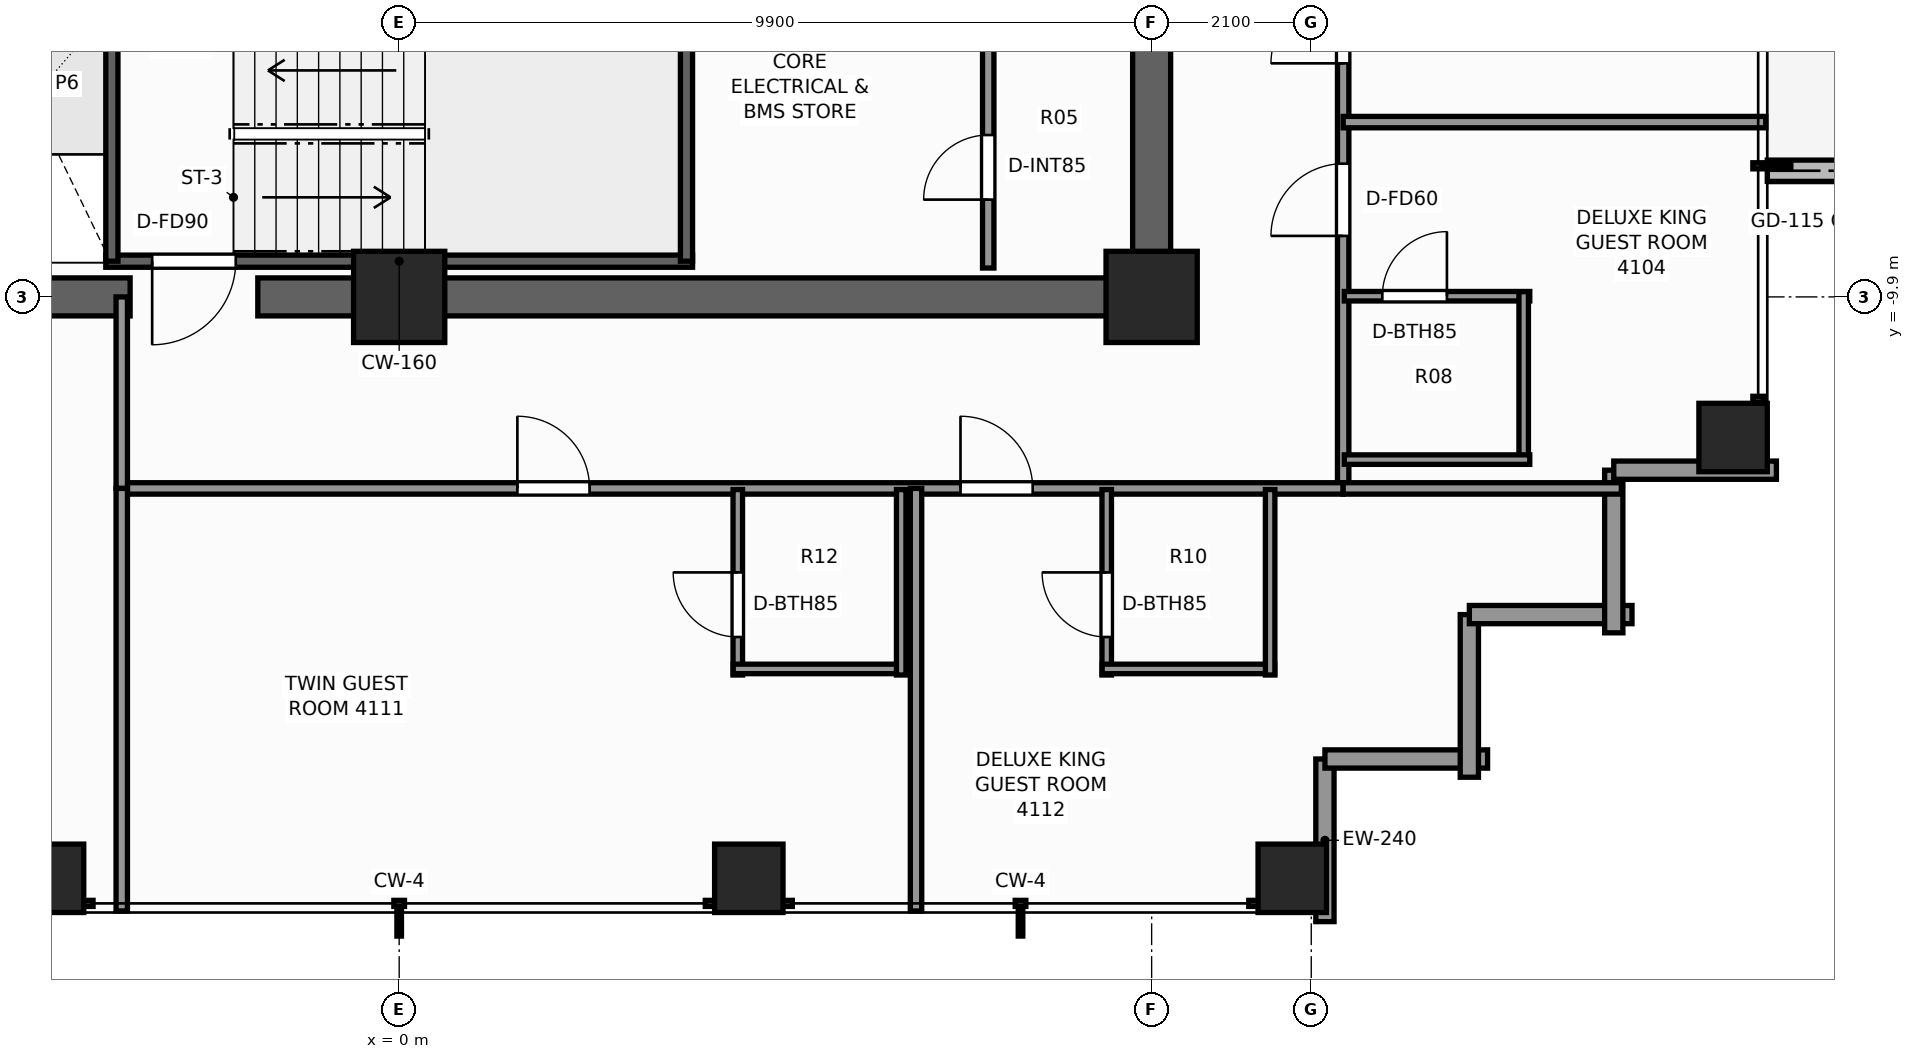
"""IFC4 building model, lengths in metres.
Left out: names, types, materials, properties, quantities, classifications, styles, units other than length and angle.
Written with IfcOpenShell. Run it as: python <this file> out.ifc"""

import sys

from ifc_helpers import new_model, si_unit, direction, frame, frame_2d, origin, origin_2d, place, context, subcontext, project, spatial, rectangle, extrude, element, fill, save


model = new_model("IFC4")
c1 = context("Model", 3, precision=1e-05, world=origin(), true_north=direction((0.0, 1.0)))
c2 = subcontext(c1, "Body", "Model", "MODEL_VIEW")
j1 = project(units=[si_unit("LENGTHUNIT", "METRE"), si_unit("PLANEANGLEUNIT", "RADIAN")], contexts=[c1])
p1 = place(None, origin())
s1 = spatial("IfcSite", under=j1, at=p1, CompositionType="ELEMENT")
p2 = place(p1, origin())
s2 = spatial("IfcBuilding", under=s1, at=p2, CompositionType="ELEMENT")
p3 = place(p2, frame((0.0, 0.0, 141.5)))
s3 = spatial("IfcBuildingStorey", under=s2, at=p3, CompositionType="ELEMENT", Elevation=141.5)
p4 = place(p3, frame((10.15, -9.9, 0.0), z_axis=(0.0, 0.0, 1.0), x_axis=(-1.0, 0.0, 0.0)))
e1 = element("IfcWall", 1, at=p4, inside=s3, PredefinedType="SHEAR", context=c2, shape_type="SweptSolid", body=[
    extrude(rectangle(XDim=12.01, YDim=0.5, at=frame_2d((6.005, 0.0))), origin(), (0.0, 0.0, 1.0), 3.3),
])
p5 = place(p3, frame((-3.54, -9.9, 0.0), z_axis=(0.0, 0.0, 1.0), x_axis=(-1.0, 0.0, 0.0)))
e2 = element("IfcWall", 2, at=p5, inside=s3, PredefinedType="SHEAR", context=c2, shape_type="SweptSolid", body=[
    extrude(rectangle(XDim=6.61, YDim=0.5, at=frame_2d((3.305, 0.0))), origin(), (0.0, 0.0, 1.0), 3.3),
])
p6 = place(p3, frame((9.9, -9.65, 0.0), z_axis=(0.0, 0.0, 1.0), x_axis=(0.0, 1.0, 0.0)))
e3 = element("IfcWall", 3, at=p6, inside=s3, PredefinedType="SHEAR", context=c2, shape_type="SweptSolid", body=[
    extrude(rectangle(XDim=4.1, YDim=0.5, at=frame_2d((2.05, 0.0))), origin(), (0.0, 0.0, 1.0), 3.3),
])
for number, where, z_axis, x_axis in (
    (4, (9.9, -9.9, 0.0), (0.0, 0.0, 1.0), (1.0, 0.0, 0.0)),
    (5, (0.0, -9.9, 0.0), (0.0, 0.0, 1.0), (1.0, 0.0, 0.0)),
):
    element("IfcColumn", number, at=place(p3, frame(where, z_axis=z_axis, x_axis=x_axis)), inside=s3, PredefinedType="COLUMN", context=c2, shape_type="SweptSolid", body=[
        extrude(rectangle(XDim=1.2, YDim=1.2, at=origin_2d()), origin(), (0.0, 0.0, 1.0), 3.3),
    ])
for number, where, z_axis, x_axis in (
    (6, (-4.6, -17.55, 0.0), (0.0, 0.0, 1.0), (1.0, 0.0, 0.0)),
    (7, (4.6, -17.55, 0.0), (0.0, 0.0, 1.0), (1.0, 0.0, 0.0)),
    (8, (11.75, -17.55, 0.0), (0.0, 0.0, 1.0), (1.0, 0.0, 0.0)),
    (9, (17.55, -11.75, 0.0), (0.0, 0.0, 1.0), (1.0, 0.0, 0.0)),
):
    element("IfcColumn", number, at=place(p3, frame(where, z_axis=z_axis, x_axis=x_axis)), inside=s3, PredefinedType="COLUMN", context=c2, shape_type="SweptSolid", body=[
        extrude(rectangle(XDim=0.9, YDim=0.9, at=origin_2d()), origin(), (0.0, 0.0, 1.0), 3.3),
    ])
p7 = place(p3, frame((18.0, -8.24, -0.02), z_axis=(0.0, 0.0, 1.0), x_axis=(1.0, 0.0, 0.0)))
e10 = element("IfcWall", 10, at=p7, inside=s3, PredefinedType="PARAPET", context=c2, shape_type="SweptSolid", body=[
    extrude(rectangle(XDim=1.313, YDim=0.28, at=frame_2d((0.656, 0.0))), origin(), (0.0, 0.0, 1.0), 0.42),
])
for number, where, z_axis, x_axis in (
    (11, (12.18, -15.98, 0.0), (0.0, 0.0, 1.0), (0.0, -1.0, 0.0)),
    (12, (14.32, -15.98, 0.0), (0.0, 0.0, 1.0), (-1.0, 0.0, 0.0)),
):
    element("IfcWall", number, at=place(p3, frame(where, z_axis=z_axis, x_axis=x_axis)), inside=s3, PredefinedType="STANDARD", context=c2, shape_type="SweptSolid", body=[
        extrude(rectangle(XDim=2.14, YDim=0.24, at=frame_2d((1.07, 0.0))), origin(), (0.0, 0.0, 1.0), 2.479),
    ])
for number, where, z_axis, x_axis in (
    (13, (14.08, -14.08, 0.0), (0.0, 0.0, 1.0), (0.0, -1.0, 0.0)),
    (14, (16.22, -14.08, 0.0), (0.0, 0.0, 1.0), (-1.0, 0.0, 0.0)),
):
    element("IfcWall", number, at=place(p3, frame(where, z_axis=z_axis, x_axis=x_axis)), inside=s3, PredefinedType="STANDARD", context=c2, shape_type="SweptSolid", body=[
        extrude(rectangle(XDim=2.14, YDim=0.24, at=frame_2d((1.07, 0.0))), origin(), (0.0, 0.0, 1.0), 2.479),
    ])
for number, where, z_axis, x_axis in (
    (15, (15.98, -12.18, 0.0), (0.0, 0.0, 1.0), (0.0, -1.0, 0.0)),
    (16, (18.12, -12.18, 0.0), (0.0, 0.0, 1.0), (-1.0, 0.0, 0.0)),
):
    element("IfcWall", number, at=place(p3, frame(where, z_axis=z_axis, x_axis=x_axis)), inside=s3, PredefinedType="STANDARD", context=c2, shape_type="SweptSolid", body=[
        extrude(rectangle(XDim=2.14, YDim=0.24, at=frame_2d((1.07, 0.0))), origin(), (0.0, 0.0, 1.0), 2.479),
    ])
p8 = place(p3, frame((3.86, -9.43, 0.0), z_axis=(0.0, 0.0, 1.0), x_axis=(-1.0, 0.0, 0.0)))
e17 = element("IfcWall", 17, at=p8, inside=s3, PredefinedType="SHEAR", context=c2, shape_type="SweptSolid", body=[
    extrude(rectangle(XDim=7.72, YDim=0.16, at=frame_2d((3.86, 0.0))), origin(), (0.0, 0.0, 1.0), 3.3),
])
p9 = place(p8, frame((6.01, 0.0, 0.0)))
e18 = element("IfcOpeningElement", 18, at=p9, cuts=e17, PredefinedType="OPENING", context=c2, shape_type="SweptSolid", body=[
    extrude(rectangle(XDim=1.1, YDim=2.2, at=frame_2d((0.55, 1.1))), frame((0.0, 0.09, 0.0), z_axis=(0.0, -1.0, 0.0), x_axis=(1.0, 0.0, 0.0)), (0.0, 0.0, 1.0), 0.18),
])
for number, where, z_axis, x_axis in (
    (19, (-3.78, -9.43, 0.0), (0.0, 0.0, 1.0), (0.0, 1.0, 0.0)),
    (20, (3.78, -9.43, 0.0), (0.0, 0.0, 1.0), (0.0, 1.0, 0.0)),
):
    element("IfcWall", number, at=place(p3, frame(where, z_axis=z_axis, x_axis=x_axis)), inside=s3, PredefinedType="SHEAR", context=c2, shape_type="SweptSolid", body=[
        extrude(rectangle(XDim=3.35, YDim=0.16, at=frame_2d((1.675, 0.0))), origin(), (0.0, 0.0, 1.0), 3.3),
    ])
p10 = place(p3, frame((7.75, -9.52, 0.0), z_axis=(0.0, 0.0, 1.0), x_axis=(0.0, 1.0, 0.0)))
e21 = element("IfcWall", 21, at=p10, inside=s3, PredefinedType="PARTITIONING", context=c2, shape_type="SweptSolid", body=[
    extrude(rectangle(XDim=3.8, YDim=0.15, at=frame_2d((1.9, 0.0))), origin(), (0.0, 0.0, 1.0), 3.1),
])
p11 = place(p10, frame((0.9, 0.0, 0.0)))
e22 = element("IfcOpeningElement", 22, at=p11, cuts=e21, PredefinedType="OPENING", context=c2, shape_type="SweptSolid", body=[
    extrude(rectangle(XDim=0.85, YDim=2.03, at=frame_2d((0.425, 1.015))), frame((0.0, 0.085, 0.0), z_axis=(0.0, -1.0, 0.0), x_axis=(1.0, 0.0, 0.0)), (0.0, 0.0, 1.0), 0.17),
])
p12 = place(p3, frame((12.42, -12.42, 0.0), z_axis=(0.0, 0.0, 1.0), x_axis=(0.0, 1.0, 0.0)))
e23 = element("IfcWall", 23, at=p12, inside=s3, PredefinedType="PARTITIONING", context=c2, shape_type="SweptSolid", body=[
    extrude(rectangle(XDim=24.84, YDim=0.15, at=frame_2d((12.42, 0.0))), origin(), (0.0, 0.0, 1.0), 2.312),
])
p13 = place(p12, frame((3.323, 0.0, 0.0)))
e24 = element("IfcOpeningElement", 24, at=p13, cuts=e23, PredefinedType="OPENING", context=c2, shape_type="SweptSolid", body=[
    extrude(rectangle(XDim=0.95, YDim=2.06, at=frame_2d((0.475, 1.03))), frame((0.0, 0.085, 0.0), z_axis=(0.0, -1.0, 0.0), x_axis=(1.0, 0.0, 0.0)), (0.0, 0.0, 1.0), 0.17),
])
p14 = place(p12, frame((5.593, 0.0, 0.0)))
e25 = element("IfcOpeningElement", 25, at=p14, cuts=e23, PredefinedType="OPENING", context=c2, shape_type="SweptSolid", body=[
    extrude(rectangle(XDim=0.95, YDim=2.06, at=frame_2d((0.475, 1.03))), frame((0.0, 0.085, 0.0), z_axis=(0.0, -1.0, 0.0), x_axis=(1.0, 0.0, 0.0)), (0.0, 0.0, 1.0), 0.17),
])
p15 = place(p12, frame((15.073, 0.0, 0.0)))
e26 = element("IfcOpeningElement", 26, at=p15, cuts=e23, PredefinedType="OPENING", context=c2, shape_type="SweptSolid", body=[
    extrude(rectangle(XDim=0.95, YDim=2.06, at=frame_2d((0.475, 1.03))), frame((0.0, 0.085, 0.0), z_axis=(0.0, -1.0, 0.0), x_axis=(1.0, 0.0, 0.0)), (0.0, 0.0, 1.0), 0.17),
])
p16 = place(p12, frame((20.05, 0.0, 0.0)))
e27 = element("IfcOpeningElement", 27, at=p16, cuts=e23, PredefinedType="OPENING", context=c2, shape_type="SweptSolid", body=[
    extrude(rectangle(XDim=0.95, YDim=2.06, at=frame_2d((0.475, 1.03))), frame((0.0, 0.085, 0.0), z_axis=(0.0, -1.0, 0.0), x_axis=(1.0, 0.0, 0.0)), (0.0, 0.0, 1.0), 0.17),
])
p17 = place(p3, frame((-3.65, -12.42, 0.0), z_axis=(0.0, 0.0, 1.0), x_axis=(1.0, 0.0, 0.0)))
e28 = element("IfcWall", 28, at=p17, inside=s3, PredefinedType="PARTITIONING", context=c2, shape_type="SweptSolid", body=[
    extrude(rectangle(XDim=16.07, YDim=0.15, at=frame_2d((8.035, 0.0))), origin(), (0.0, 0.0, 1.0), 2.312),
])
p18 = place(p17, frame((5.205, 0.0, 0.0)))
e29 = element("IfcOpeningElement", 29, at=p18, cuts=e28, PredefinedType="OPENING", context=c2, shape_type="SweptSolid", body=[
    extrude(rectangle(XDim=0.95, YDim=2.06, at=frame_2d((0.475, 1.03))), frame((0.0, 0.085, 0.0), z_axis=(0.0, -1.0, 0.0), x_axis=(1.0, 0.0, 0.0)), (0.0, 0.0, 1.0), 0.17),
])
p19 = place(p17, frame((11.035, 0.0, 0.0)))
e30 = element("IfcOpeningElement", 30, at=p19, cuts=e28, PredefinedType="OPENING", context=c2, shape_type="SweptSolid", body=[
    extrude(rectangle(XDim=0.95, YDim=2.06, at=frame_2d((0.475, 1.03))), frame((0.0, 0.085, 0.0), z_axis=(0.0, -1.0, 0.0), x_axis=(1.0, 0.0, 0.0)), (0.0, 0.0, 1.0), 0.17),
])
p20 = place(p3, frame((-3.65, -12.42, 0.0), z_axis=(0.0, 0.0, 1.0), x_axis=(0.0, 1.0, 0.0)))
e31 = element("IfcWall", 31, at=p20, inside=s3, PredefinedType="PARTITIONING", context=c2, shape_type="SweptSolid", body=[
    extrude(rectangle(XDim=2.52, YDim=0.15, at=frame_2d((1.26, 0.0))), origin(), (0.0, 0.0, 1.0), 3.1),
])
p21 = place(p3, frame((12.42, -12.42, 0.0), z_axis=(0.0, 0.0, 1.0), x_axis=(1.0, 0.0, 0.0)))
e32 = element("IfcWall", 32, at=p21, inside=s3, PredefinedType="PARTITIONING", context=c2, shape_type="SweptSolid", body=[
    extrude(rectangle(XDim=3.66, YDim=0.15, at=frame_2d((1.83, 0.0))), origin(), (0.0, 0.0, 1.0), 3.1),
])
p22 = place(p3, frame((12.42, -7.6, 0.0), z_axis=(0.0, 0.0, 1.0), x_axis=(1.0, 0.0, 0.0)))
e33 = element("IfcWall", 33, at=p22, inside=s3, PredefinedType="PARTITIONING", context=c2, shape_type="SweptSolid", body=[
    extrude(rectangle(XDim=5.56, YDim=0.15, at=frame_2d((2.78, 0.0))), origin(), (0.0, 0.0, 1.0), 2.469),
])
p23 = place(p3, frame((12.435, -9.891, 0.0), z_axis=(0.0, 0.0, 1.0), x_axis=(1.0, 0.0, 0.0)))
e34 = element("IfcWall", 34, at=p23, inside=s3, PredefinedType="PARTITIONING", context=c2, shape_type="SweptSolid", body=[
    extrude(rectangle(XDim=2.44, YDim=0.125, at=frame_2d((1.22, 0.0))), origin(), (0.0, 0.0, 1.0), 3.1),
])
p24 = place(p23, frame((0.5, 0.0, 0.0)))
e35 = element("IfcOpeningElement", 35, at=p24, cuts=e34, PredefinedType="OPENING", context=c2, shape_type="SweptSolid", body=[
    extrude(rectangle(XDim=0.85, YDim=2.03, at=frame_2d((0.425, 1.015))), frame((0.0, 0.073, 0.0), z_axis=(0.0, -1.0, 0.0), x_axis=(1.0, 0.0, 0.0)), (0.0, 0.0, 1.0), 0.145),
])
p25 = place(p3, frame((14.795, -12.101, 0.0), z_axis=(0.0, 0.0, 1.0), x_axis=(0.0, 1.0, 0.0)))
e36 = element("IfcWall", 36, at=p25, inside=s3, PredefinedType="PARTITIONING", context=c2, shape_type="SweptSolid", body=[
    extrude(rectangle(XDim=2.27, YDim=0.125, at=frame_2d((1.135, 0.0))), origin(), (0.0, 0.0, 1.0), 2.312),
])
p26 = place(p3, frame((12.435, -12.041, 0.0), z_axis=(0.0, 0.0, 1.0), x_axis=(1.0, 0.0, 0.0)))
e37 = element("IfcWall", 37, at=p26, inside=s3, PredefinedType="PARTITIONING", context=c2, shape_type="SweptSolid", body=[
    extrude(rectangle(XDim=2.44, YDim=0.125, at=frame_2d((1.22, 0.0))), origin(), (0.0, 0.0, 1.0), 3.1),
])
for number, where, z_axis, x_axis in (
    (38, (-3.65, -17.98, 0.0), (0.0, 0.0, 1.0), (0.0, 1.0, 0.0)),
    (39, (6.8, -17.98, 0.0), (0.0, 0.0, 1.0), (0.0, 1.0, 0.0)),
):
    element("IfcWall", number, at=place(p3, frame(where, z_axis=z_axis, x_axis=x_axis)), inside=s3, PredefinedType="PARTITIONING", context=c2, shape_type="SweptSolid", body=[
        extrude(rectangle(XDim=5.56, YDim=0.15, at=frame_2d((2.78, 0.0))), origin(), (0.0, 0.0, 1.0), 2.469),
    ])
p27 = place(p3, frame((4.455, -14.875, 0.0), z_axis=(0.0, 0.0, 1.0), x_axis=(0.0, 1.0, 0.0)))
e40 = element("IfcWall", 40, at=p27, inside=s3, PredefinedType="PARTITIONING", context=c2, shape_type="SweptSolid", body=[
    extrude(rectangle(XDim=2.44, YDim=0.125, at=frame_2d((1.22, 0.0))), origin(), (0.0, 0.0, 1.0), 2.312),
])
p28 = place(p27, frame((0.5, 0.0, 0.0)))
e41 = element("IfcOpeningElement", 41, at=p28, cuts=e40, PredefinedType="OPENING", context=c2, shape_type="SweptSolid", body=[
    extrude(rectangle(XDim=0.85, YDim=2.03, at=frame_2d((0.425, 1.015))), frame((0.0, 0.073, 0.0), z_axis=(0.0, -1.0, 0.0), x_axis=(1.0, 0.0, 0.0)), (0.0, 0.0, 1.0), 0.145),
])
p29 = place(p3, frame((4.395, -14.795, 0.0), z_axis=(0.0, 0.0, 1.0), x_axis=(1.0, 0.0, 0.0)))
e42 = element("IfcWall", 42, at=p29, inside=s3, PredefinedType="PARTITIONING", context=c2, shape_type="SweptSolid", body=[
    extrude(rectangle(XDim=2.27, YDim=0.125, at=frame_2d((1.135, 0.0))), origin(), (0.0, 0.0, 1.0), 2.312),
])
p30 = place(p3, frame((6.605, -14.875, 0.0), z_axis=(0.0, 0.0, 1.0), x_axis=(0.0, 1.0, 0.0)))
e43 = element("IfcWall", 43, at=p30, inside=s3, PredefinedType="PARTITIONING", context=c2, shape_type="SweptSolid", body=[
    extrude(rectangle(XDim=2.44, YDim=0.125, at=frame_2d((1.22, 0.0))), origin(), (0.0, 0.0, 1.0), 3.1),
])
p31 = place(p3, frame((9.309, -14.875, 0.0), z_axis=(0.0, 0.0, 1.0), x_axis=(0.0, 1.0, 0.0)))
e44 = element("IfcWall", 44, at=p31, inside=s3, PredefinedType="PARTITIONING", context=c2, shape_type="SweptSolid", body=[
    extrude(rectangle(XDim=2.44, YDim=0.125, at=frame_2d((1.22, 0.0))), origin(), (0.0, 0.0, 1.0), 3.1),
])
p32 = place(p31, frame((0.5, 0.0, 0.0)))
e45 = element("IfcOpeningElement", 45, at=p32, cuts=e44, PredefinedType="OPENING", context=c2, shape_type="SweptSolid", body=[
    extrude(rectangle(XDim=0.85, YDim=2.03, at=frame_2d((0.425, 1.015))), frame((0.0, 0.073, 0.0), z_axis=(0.0, -1.0, 0.0), x_axis=(1.0, 0.0, 0.0)), (0.0, 0.0, 1.0), 0.145),
])
p33 = place(p3, frame((9.249, -14.795, 0.0), z_axis=(0.0, 0.0, 1.0), x_axis=(1.0, 0.0, 0.0)))
e46 = element("IfcWall", 46, at=p33, inside=s3, PredefinedType="PARTITIONING", context=c2, shape_type="SweptSolid", body=[
    extrude(rectangle(XDim=2.27, YDim=0.125, at=frame_2d((1.135, 0.0))), origin(), (0.0, 0.0, 1.0), 2.312),
])
p34 = place(p3, frame((11.459, -14.875, 0.0), z_axis=(0.0, 0.0, 1.0), x_axis=(0.0, 1.0, 0.0)))
e47 = element("IfcWall", 47, at=p34, inside=s3, PredefinedType="PARTITIONING", context=c2, shape_type="SweptSolid", body=[
    extrude(rectangle(XDim=2.44, YDim=0.125, at=frame_2d((1.22, 0.0))), origin(), (0.0, 0.0, 1.0), 3.1),
])
p35 = place(p9, origin())
e48 = element("IfcDoor", 48, at=p35, inside=s3, OperationType="SINGLE_SWING_RIGHT", PredefinedType="DOOR", context=c2, shape_type="SweptSolid", body=[
    extrude(rectangle(XDim=1.1, YDim=2.2, at=frame_2d((0.55, 1.1))), frame((0.0, 0.025, 0.0), z_axis=(0.0, -1.0, 0.0), x_axis=(1.0, 0.0, 0.0)), (0.0, 0.0, 1.0), 0.05),
])
fill(e18, e48)
p36 = place(p11, origin())
e49 = element("IfcDoor", 49, at=p36, inside=s3, OperationType="SINGLE_SWING_LEFT", PredefinedType="DOOR", context=c2, shape_type="SweptSolid", body=[
    extrude(rectangle(XDim=0.85, YDim=2.03, at=frame_2d((0.425, 1.015))), frame((0.0, 0.025, 0.0), z_axis=(0.0, -1.0, 0.0), x_axis=(1.0, 0.0, 0.0)), (0.0, 0.0, 1.0), 0.05),
])
fill(e22, e49)
p37 = place(p24, origin())
e50 = element("IfcDoor", 50, at=p37, inside=s3, OperationType="SINGLE_SWING_RIGHT", PredefinedType="DOOR", context=c2, shape_type="SweptSolid", body=[
    extrude(rectangle(XDim=0.85, YDim=2.03, at=frame_2d((0.425, 1.015))), frame((0.0, 0.025, 0.0), z_axis=(0.0, -1.0, 0.0), x_axis=(1.0, 0.0, 0.0)), (0.0, 0.0, 1.0), 0.05),
])
fill(e35, e50)
p38 = place(p13, origin())
e51 = element("IfcDoor", 51, at=p38, inside=s3, OperationType="SINGLE_SWING_LEFT", PredefinedType="DOOR", context=c2, shape_type="SweptSolid", body=[
    extrude(rectangle(XDim=0.95, YDim=2.06, at=frame_2d((0.475, 1.03))), frame((0.0, 0.025, 0.0), z_axis=(0.0, -1.0, 0.0), x_axis=(1.0, 0.0, 0.0)), (0.0, 0.0, 1.0), 0.05),
])
fill(e24, e51)
p39 = place(p14, origin())
e52 = element("IfcDoor", 52, at=p39, inside=s3, OperationType="SINGLE_SWING_LEFT", PredefinedType="DOOR", context=c2, shape_type="SweptSolid", body=[
    extrude(rectangle(XDim=0.95, YDim=2.06, at=frame_2d((0.475, 1.03))), frame((0.0, 0.025, 0.0), z_axis=(0.0, -1.0, 0.0), x_axis=(1.0, 0.0, 0.0)), (0.0, 0.0, 1.0), 0.05),
])
fill(e25, e52)
p40 = place(p28, origin())
e53 = element("IfcDoor", 53, at=p40, inside=s3, OperationType="SINGLE_SWING_RIGHT", PredefinedType="DOOR", context=c2, shape_type="SweptSolid", body=[
    extrude(rectangle(XDim=0.85, YDim=2.03, at=frame_2d((0.425, 1.015))), frame((0.0, 0.025, 0.0), z_axis=(0.0, -1.0, 0.0), x_axis=(1.0, 0.0, 0.0)), (0.0, 0.0, 1.0), 0.05),
])
fill(e41, e53)
p41 = place(p18, origin())
e54 = element("IfcDoor", 54, at=p41, inside=s3, OperationType="SINGLE_SWING_LEFT", PredefinedType="DOOR", context=c2, shape_type="SweptSolid", body=[
    extrude(rectangle(XDim=0.95, YDim=2.06, at=frame_2d((0.475, 1.03))), frame((0.0, 0.025, 0.0), z_axis=(0.0, -1.0, 0.0), x_axis=(1.0, 0.0, 0.0)), (0.0, 0.0, 1.0), 0.05),
])
fill(e29, e54)
p42 = place(p32, origin())
e55 = element("IfcDoor", 55, at=p42, inside=s3, OperationType="SINGLE_SWING_RIGHT", PredefinedType="DOOR", context=c2, shape_type="SweptSolid", body=[
    extrude(rectangle(XDim=0.85, YDim=2.03, at=frame_2d((0.425, 1.015))), frame((0.0, 0.025, 0.0), z_axis=(0.0, -1.0, 0.0), x_axis=(1.0, 0.0, 0.0)), (0.0, 0.0, 1.0), 0.05),
])
fill(e45, e55)
p43 = place(p19, origin())
e56 = element("IfcDoor", 56, at=p43, inside=s3, OperationType="SINGLE_SWING_LEFT", PredefinedType="DOOR", context=c2, shape_type="SweptSolid", body=[
    extrude(rectangle(XDim=0.95, YDim=2.06, at=frame_2d((0.475, 1.03))), frame((0.0, 0.025, 0.0), z_axis=(0.0, -1.0, 0.0), x_axis=(1.0, 0.0, 0.0)), (0.0, 0.0, 1.0), 0.05),
])
fill(e30, e56)
save(model, sys.argv[1])
